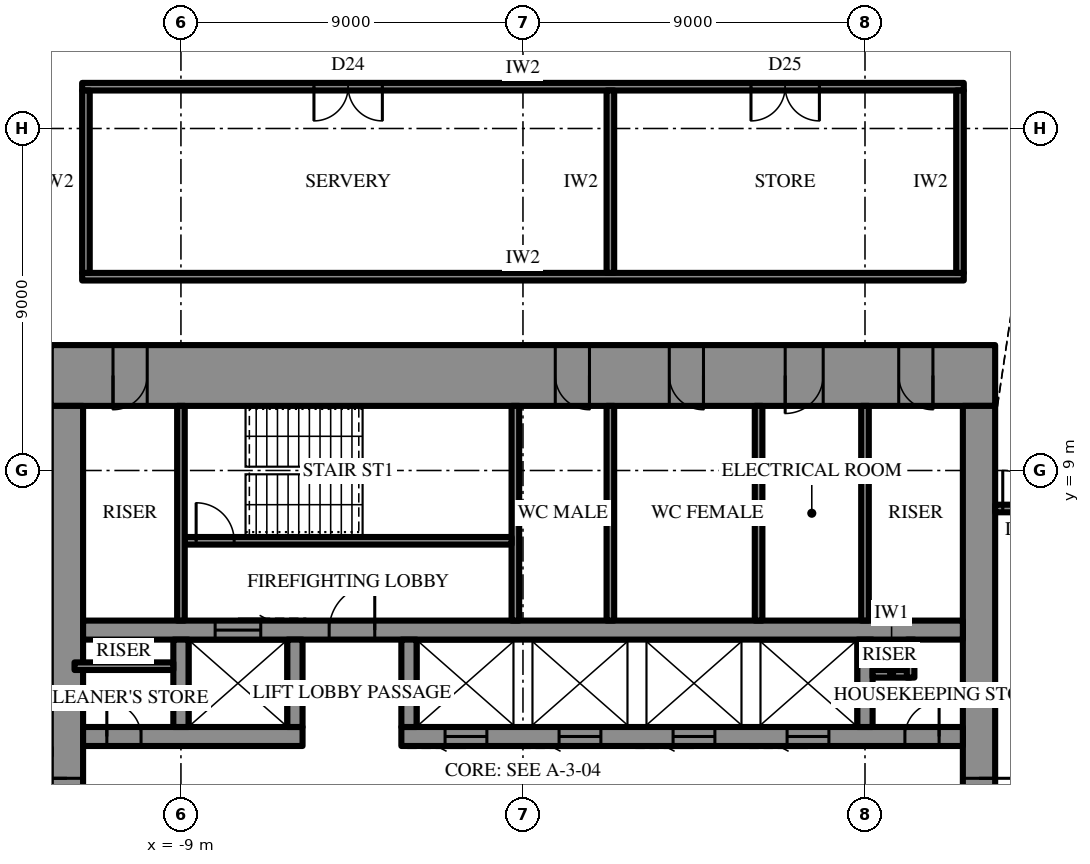
"""IFC4 building model, lengths in metres.
Left out: names, types, materials, properties, quantities, classifications, styles, units other than length and angle.
Written with IfcOpenShell. Run it as: python <this file> out.ifc"""

import sys

from ifc_helpers import new_model, si_unit, direction, frame, frame_2d, origin, place, context, subcontext, project, spatial, rectangle, extrude, element, fill, save


model = new_model("IFC4")
c1 = context("Model", 3, precision=1e-05, world=origin(), true_north=direction((0.0, 1.0)))
c2 = subcontext(c1, "Body", "Model", "MODEL_VIEW")
j1 = project(units=[si_unit("LENGTHUNIT", "METRE"), si_unit("PLANEANGLEUNIT", "RADIAN")], contexts=[c1])
p1 = place(None, origin())
s1 = spatial("IfcSite", under=j1, at=p1, CompositionType="ELEMENT")
p2 = place(p1, origin())
s2 = spatial("IfcBuilding", under=s1, at=p2, CompositionType="ELEMENT")
p3 = place(p2, frame((0.0, 0.0, 387.1)))
s3 = spatial("IfcBuildingStorey", under=s2, at=p3, CompositionType="ELEMENT", Elevation=387.1)
p4 = place(p3, frame((-12.425, 11.5, 0.0), z_axis=(0.0, 0.0, 1.0), x_axis=(1.0, 0.0, 0.0)))
e1 = element("IfcWall", 1, at=p4, inside=s3, PredefinedType="SHEAR", context=c2, shape_type="SweptSolid", body=[
    extrude(rectangle(XDim=24.85, YDim=1.6, at=frame_2d((12.425, 0.0))), origin(), (0.0, 0.0, 1.0), 4.2),
])
p5 = place(p4, frame((13.275, 0.0, 0.0)))
e2 = element("IfcOpeningElement", 2, at=p5, cuts=e1, PredefinedType="OPENING", context=c2, shape_type="SweptSolid", body=[
    extrude(rectangle(XDim=0.9, YDim=2.2, at=frame_2d((0.45, 1.1))), frame((0.0, 0.81, 0.0), z_axis=(0.0, -1.0, 0.0), x_axis=(1.0, 0.0, 0.0)), (0.0, 0.0, 1.0), 1.62),
])
p6 = place(p4, frame((16.275, 0.0, 0.0)))
e3 = element("IfcOpeningElement", 3, at=p6, cuts=e1, PredefinedType="OPENING", context=c2, shape_type="SweptSolid", body=[
    extrude(rectangle(XDim=0.9, YDim=2.2, at=frame_2d((0.45, 1.1))), frame((0.0, 0.81, 0.0), z_axis=(0.0, -1.0, 0.0), x_axis=(1.0, 0.0, 0.0)), (0.0, 0.0, 1.0), 1.62),
])
p7 = place(p4, frame((19.325, 0.0, 0.0)))
e4 = element("IfcOpeningElement", 4, at=p7, cuts=e1, PredefinedType="OPENING", context=c2, shape_type="SweptSolid", body=[
    extrude(rectangle(XDim=1.0, YDim=2.2, at=frame_2d((0.5, 1.1))), frame((0.0, 0.81, 0.0), z_axis=(0.0, -1.0, 0.0), x_axis=(1.0, 0.0, 0.0)), (0.0, 0.0, 1.0), 1.62),
])
p8 = place(p4, frame((1.637, 0.0, 0.0)))
e5 = element("IfcOpeningElement", 5, at=p8, cuts=e1, PredefinedType="OPENING", context=c2, shape_type="SweptSolid", body=[
    extrude(rectangle(XDim=0.9, YDim=2.2, at=frame_2d((0.45, 1.1))), frame((0.0, 0.81, 0.0), z_axis=(0.0, -1.0, 0.0), x_axis=(1.0, 0.0, 0.0)), (0.0, 0.0, 1.0), 1.62),
])
p9 = place(p4, frame((22.312, 0.0, 0.0)))
e6 = element("IfcOpeningElement", 6, at=p9, cuts=e1, PredefinedType="OPENING", context=c2, shape_type="SweptSolid", body=[
    extrude(rectangle(XDim=0.9, YDim=2.2, at=frame_2d((0.45, 1.1))), frame((0.0, 0.81, 0.0), z_axis=(0.0, -1.0, 0.0), x_axis=(1.0, 0.0, 0.0)), (0.0, 0.0, 1.0), 1.62),
])
p10 = place(p3, frame((12.0, -10.7, 0.0), z_axis=(0.0, 0.0, 1.0), x_axis=(0.0, 1.0, 0.0)))
e7 = element("IfcWall", 7, at=p10, inside=s3, PredefinedType="SHEAR", context=c2, shape_type="SweptSolid", body=[
    extrude(rectangle(XDim=21.4, YDim=0.85, at=frame_2d((10.7, 0.0))), origin(), (0.0, 0.0, 1.0), 4.2),
])
p11 = place(p10, frame((9.8, 0.0, 0.0)))
e8 = element("IfcOpeningElement", 8, at=p11, cuts=e7, PredefinedType="OPENING", context=c2, shape_type="SweptSolid", body=[
    extrude(rectangle(XDim=1.8, YDim=2.4, at=frame_2d((0.9, 1.2))), frame((0.0, 0.435, 0.0), z_axis=(0.0, -1.0, 0.0), x_axis=(1.0, 0.0, 0.0)), (0.0, 0.0, 1.0), 0.87),
])
p12 = place(p3, frame((-12.0, 10.7, 0.0), z_axis=(0.0, 0.0, 1.0), x_axis=(0.0, -1.0, 0.0)))
e9 = element("IfcWall", 9, at=p12, inside=s3, PredefinedType="SHEAR", context=c2, shape_type="SweptSolid", body=[
    extrude(rectangle(XDim=21.4, YDim=0.85, at=frame_2d((10.7, 0.0))), origin(), (0.0, 0.0, 1.0), 4.2),
])
p13 = place(p12, frame((9.8, 0.0, 0.0)))
e10 = element("IfcOpeningElement", 10, at=p13, cuts=e9, PredefinedType="OPENING", context=c2, shape_type="SweptSolid", body=[
    extrude(rectangle(XDim=1.8, YDim=2.4, at=frame_2d((0.9, 1.2))), frame((0.0, 0.435, 0.0), z_axis=(0.0, -1.0, 0.0), x_axis=(1.0, 0.0, 0.0)), (0.0, 0.0, 1.0), 0.87),
])
p14 = place(p3, frame((-11.575, 2.0, 0.0), z_axis=(0.0, 0.0, 1.0), x_axis=(1.0, 0.0, 0.0)))
e11 = element("IfcWall", 11, at=p14, inside=s3, PredefinedType="SHEAR", context=c2, shape_type="SweptSolid", body=[
    extrude(rectangle(XDim=5.775, YDim=0.5, at=frame_2d((2.887, 0.0))), origin(), (0.0, 0.0, 1.0), 4.2),
])
p15 = place(p14, frame((0.625, 0.0, 0.0)))
e12 = element("IfcOpeningElement", 12, at=p15, cuts=e11, PredefinedType="OPENING", context=c2, shape_type="SweptSolid", body=[
    extrude(rectangle(XDim=0.9, YDim=2.2, at=frame_2d((0.45, 1.1))), frame((0.0, 0.26, 0.0), z_axis=(0.0, -1.0, 0.0), x_axis=(1.0, 0.0, 0.0)), (0.0, 0.0, 1.0), 0.52),
])
p16 = place(p3, frame((-3.2, 2.0, 0.0), z_axis=(0.0, 0.0, 1.0), x_axis=(1.0, 0.0, 0.0)))
e13 = element("IfcWall", 13, at=p16, inside=s3, PredefinedType="SHEAR", context=c2, shape_type="SweptSolid", body=[
    extrude(rectangle(XDim=14.775, YDim=0.5, at=frame_2d((7.387, 0.0))), origin(), (0.0, 0.0, 1.0), 4.2),
])
p17 = place(p16, frame((13.25, 0.0, 0.0)))
e14 = element("IfcOpeningElement", 14, at=p17, cuts=e13, PredefinedType="OPENING", context=c2, shape_type="SweptSolid", body=[
    extrude(rectangle(XDim=0.9, YDim=2.2, at=frame_2d((0.45, 1.1))), frame((0.0, 0.26, 0.0), z_axis=(0.0, -1.0, 0.0), x_axis=(1.0, 0.0, 0.0)), (0.0, 0.0, 1.0), 0.52),
])
p18 = place(p16, frame((1.15, 0.0, 0.0)))
e15 = element("IfcOpeningElement", 15, at=p18, cuts=e13, PredefinedType="OPENING", context=c2, shape_type="SweptSolid", body=[
    extrude(rectangle(XDim=1.1, YDim=2.2, at=frame_2d((0.55, 1.1))), frame((0.0, 0.26, 0.0), z_axis=(0.0, -1.0, 0.0), x_axis=(1.0, 0.0, 0.0)), (0.0, 0.0, 1.0), 0.52),
])
p19 = place(p16, frame((4.15, 0.0, 0.0)))
e16 = element("IfcOpeningElement", 16, at=p19, cuts=e13, PredefinedType="OPENING", context=c2, shape_type="SweptSolid", body=[
    extrude(rectangle(XDim=1.1, YDim=2.2, at=frame_2d((0.55, 1.1))), frame((0.0, 0.26, 0.0), z_axis=(0.0, -1.0, 0.0), x_axis=(1.0, 0.0, 0.0)), (0.0, 0.0, 1.0), 0.52),
])
p20 = place(p16, frame((7.15, 0.0, 0.0)))
e17 = element("IfcOpeningElement", 17, at=p20, cuts=e13, PredefinedType="OPENING", context=c2, shape_type="SweptSolid", body=[
    extrude(rectangle(XDim=1.1, YDim=2.2, at=frame_2d((0.55, 1.1))), frame((0.0, 0.26, 0.0), z_axis=(0.0, -1.0, 0.0), x_axis=(1.0, 0.0, 0.0)), (0.0, 0.0, 1.0), 0.52),
])
p21 = place(p16, frame((10.15, 0.0, 0.0)))
e18 = element("IfcOpeningElement", 18, at=p21, cuts=e13, PredefinedType="OPENING", context=c2, shape_type="SweptSolid", body=[
    extrude(rectangle(XDim=1.1, YDim=2.2, at=frame_2d((0.55, 1.1))), frame((0.0, 0.26, 0.0), z_axis=(0.0, -1.0, 0.0), x_axis=(1.0, 0.0, 0.0)), (0.0, 0.0, 1.0), 0.52),
])
p22 = place(p3, frame((-11.575, 4.8, 0.0), z_axis=(0.0, 0.0, 1.0), x_axis=(1.0, 0.0, 0.0)))
e19 = element("IfcWall", 19, at=p22, inside=s3, PredefinedType="SHEAR", context=c2, shape_type="SweptSolid", body=[
    extrude(rectangle(XDim=23.15, YDim=0.5, at=frame_2d((11.575, 0.0))), origin(), (0.0, 0.0, 1.0), 4.2),
])
p23 = place(p22, frame((6.475, 0.0, 0.0)))
e20 = element("IfcOpeningElement", 20, at=p23, cuts=e19, PredefinedType="OPENING", context=c2, shape_type="SweptSolid", body=[
    extrude(rectangle(XDim=1.2, YDim=2.2, at=frame_2d((0.6, 1.1))), frame((0.0, 0.26, 0.0), z_axis=(0.0, -1.0, 0.0), x_axis=(1.0, 0.0, 0.0)), (0.0, 0.0, 1.0), 0.52),
])
p24 = place(p22, frame((3.475, 0.0, 0.0)))
e21 = element("IfcOpeningElement", 21, at=p24, cuts=e19, PredefinedType="OPENING", context=c2, shape_type="SweptSolid", body=[
    extrude(rectangle(XDim=1.2, YDim=2.2, at=frame_2d((0.6, 1.1))), frame((0.0, 0.26, 0.0), z_axis=(0.0, -1.0, 0.0), x_axis=(1.0, 0.0, 0.0)), (0.0, 0.0, 1.0), 0.52),
])
for number, where, z_axis, x_axis in (
    (22, (-9.0, 2.25, 0.0), (0.0, 0.0, 1.0), (0.0, 1.0, 0.0)),
    (23, (-6.0, 2.25, 0.0), (0.0, 0.0, 1.0), (0.0, 1.0, 0.0)),
    (24, (-3.0, 2.25, 0.0), (0.0, 0.0, 1.0), (0.0, 1.0, 0.0)),
    (25, (9.0, 2.25, 0.0), (0.0, 0.0, 1.0), (0.0, 1.0, 0.0)),
):
    element("IfcWall", number, at=place(p3, frame(where, z_axis=z_axis, x_axis=x_axis)), inside=s3, PredefinedType="SHEAR", context=c2, shape_type="SweptSolid", body=[
        extrude(rectangle(XDim=2.3, YDim=0.4, at=frame_2d((1.15, 0.0))), origin(), (0.0, 0.0, 1.0), 4.2),
    ])
p25 = place(p3, frame((-0.2, 5.05, 0.0), z_axis=(0.0, 0.0, 1.0), x_axis=(0.0, 1.0, 0.0)))
e26 = element("IfcWall", 26, at=p25, inside=s3, PredefinedType="SHEAR", context=c2, shape_type="SweptSolid", body=[
    extrude(rectangle(XDim=5.65, YDim=0.2, at=frame_2d((2.825, 0.0))), origin(), (0.0, 0.0, 1.0), 4.2),
])
p26 = place(p3, frame((-8.9, 7.15, 0.0), z_axis=(0.0, 0.0, 1.0), x_axis=(1.0, 0.0, 0.0)))
e27 = element("IfcWall", 27, at=p26, inside=s3, PredefinedType="SHEAR", context=c2, shape_type="SweptSolid", body=[
    extrude(rectangle(XDim=8.6, YDim=0.2, at=frame_2d((4.3, 0.0))), origin(), (0.0, 0.0, 1.0), 4.2),
])
p27 = place(p26, frame((0.3, 0.0, 0.0)))
e28 = element("IfcOpeningElement", 28, at=p27, cuts=e27, PredefinedType="OPENING", context=c2, shape_type="SweptSolid", body=[
    extrude(rectangle(XDim=1.0, YDim=2.2, at=frame_2d((0.5, 1.1))), frame((0.0, 0.11, 0.0), z_axis=(0.0, -1.0, 0.0), x_axis=(1.0, 0.0, 0.0)), (0.0, 0.0, 1.0), 0.22),
])
for number, where, z_axis, x_axis in (
    (29, (-9.0, 5.05, 0.0), (0.0, 0.0, 1.0), (0.0, 1.0, 0.0)),
    (30, (9.0, 5.05, 0.0), (0.0, 0.0, 1.0), (0.0, 1.0, 0.0)),
    (31, (2.3, 5.05, 0.0), (0.0, 0.0, 1.0), (0.0, 1.0, 0.0)),
    (32, (6.2, 5.05, 0.0), (0.0, 0.0, 1.0), (0.0, 1.0, 0.0)),
):
    element("IfcWall", number, at=place(p3, frame(where, z_axis=z_axis, x_axis=x_axis)), inside=s3, PredefinedType="PARTITIONING", context=c2, shape_type="SweptSolid", body=[
        extrude(rectangle(XDim=5.65, YDim=0.2, at=frame_2d((2.825, 0.0))), origin(), (0.0, 0.0, 1.0), 4.0),
    ])
p28 = place(p3, frame((-11.8, 3.85, 0.0), z_axis=(0.0, 0.0, 1.0), x_axis=(1.0, 0.0, 0.0)))
e33 = element("IfcWall", 33, at=p28, inside=s3, PredefinedType="PARTITIONING", context=c2, shape_type="SweptSolid", body=[
    extrude(rectangle(XDim=2.6, YDim=0.2, at=frame_2d((1.3, 0.0))), origin(), (0.0, 0.0, 1.0), 4.0),
])
for number, where, z_axis, x_axis in (
    (34, (9.2, 3.65, 0.0), (0.0, 0.0, 1.0), (1.0, 0.0, 0.0)),
    (35, (10.2, 3.55, 0.0), (0.0, 0.0, 1.0), (0.0, 1.0, 0.0)),
):
    element("IfcWall", number, at=place(p3, frame(where, z_axis=z_axis, x_axis=x_axis)), inside=s3, PredefinedType="PARTITIONING", context=c2, shape_type="SweptSolid", body=[
        extrude(rectangle(XDim=1.0, YDim=0.2, at=frame_2d((0.5, 0.0))), origin(), (0.0, 0.0, 1.0), 4.0),
    ])
p29 = place(p3, frame((-11.6, 14.1, 0.0), z_axis=(0.0, 0.0, 1.0), x_axis=(1.0, 0.0, 0.0)))
e36 = element("IfcWall", 36, at=p29, inside=s3, PredefinedType="PARTITIONING", context=c2, shape_type="SweptSolid", body=[
    extrude(rectangle(XDim=23.2, YDim=0.2, at=frame_2d((11.6, 0.0))), origin(), (0.0, 0.0, 1.0), 4.0),
])
p30 = place(p3, frame((-11.6, 19.1, 0.0), z_axis=(0.0, 0.0, 1.0), x_axis=(1.0, 0.0, 0.0)))
e37 = element("IfcWall", 37, at=p30, inside=s3, PredefinedType="PARTITIONING", context=c2, shape_type="SweptSolid", body=[
    extrude(rectangle(XDim=23.2, YDim=0.2, at=frame_2d((11.6, 0.0))), origin(), (0.0, 0.0, 1.0), 4.0),
])
p31 = place(p30, frame((6.1, 0.0, 0.0)))
e38 = element("IfcOpeningElement", 38, at=p31, cuts=e37, PredefinedType="OPENING", context=c2, shape_type="SweptSolid", body=[
    extrude(rectangle(XDim=1.8, YDim=2.4, at=frame_2d((0.9, 1.2))), frame((0.0, 0.11, 0.0), z_axis=(0.0, -1.0, 0.0), x_axis=(1.0, 0.0, 0.0)), (0.0, 0.0, 1.0), 0.22),
])
p32 = place(p30, frame((17.6, 0.0, 0.0)))
e39 = element("IfcOpeningElement", 39, at=p32, cuts=e37, PredefinedType="OPENING", context=c2, shape_type="SweptSolid", body=[
    extrude(rectangle(XDim=1.8, YDim=2.4, at=frame_2d((0.9, 1.2))), frame((0.0, 0.11, 0.0), z_axis=(0.0, -1.0, 0.0), x_axis=(1.0, 0.0, 0.0)), (0.0, 0.0, 1.0), 0.22),
])
for number, where, z_axis, x_axis in (
    (40, (-11.5, 14.2, 0.0), (0.0, 0.0, 1.0), (0.0, 1.0, 0.0)),
    (41, (2.3, 14.2, 0.0), (0.0, 0.0, 1.0), (0.0, 1.0, 0.0)),
    (42, (11.5, 14.2, 0.0), (0.0, 0.0, 1.0), (0.0, 1.0, 0.0)),
):
    element("IfcWall", number, at=place(p3, frame(where, z_axis=z_axis, x_axis=x_axis)), inside=s3, PredefinedType="PARTITIONING", context=c2, shape_type="SweptSolid", body=[
        extrude(rectangle(XDim=4.8, YDim=0.2, at=frame_2d((2.4, 0.0))), origin(), (0.0, 0.0, 1.0), 4.0),
    ])
p33 = place(p3, frame((12.425, 8.0, 0.0), z_axis=(0.0, 0.0, 1.0), x_axis=(1.0, 0.0, 0.0)))
e43 = element("IfcWall", 43, at=p33, inside=s3, PredefinedType="PARTITIONING", context=c2, shape_type="SweptSolid", body=[
    extrude(rectangle(XDim=5.646, YDim=0.2, at=frame_2d((2.823, 0.0))), origin(), (0.0, 0.0, 1.0), 4.0),
])
p34 = place(p33, frame((0.2, 0.0, 0.0)))
e44 = element("IfcOpeningElement", 44, at=p34, cuts=e43, PredefinedType="OPENING", context=c2, shape_type="SweptSolid", body=[
    extrude(rectangle(XDim=1.0, YDim=2.2, at=frame_2d((0.5, 1.1))), frame((0.0, 0.11, 0.0), z_axis=(0.0, -1.0, 0.0), x_axis=(1.0, 0.0, 0.0)), (0.0, 0.0, 1.0), 0.22),
])
p35 = place(p11, frame((1.8, 0.0, 0.0), z_axis=(0.0, 0.0, 1.0), x_axis=(-1.0, 0.0, 0.0)))
e45 = element("IfcDoor", 45, at=p35, inside=s3, OperationType="DOUBLE_DOOR_SINGLE_SWING", PredefinedType="DOOR", context=c2, shape_type="SweptSolid", body=[
    extrude(rectangle(XDim=1.8, YDim=2.4, at=frame_2d((0.9, 1.2))), frame((0.0, 0.025, 0.0), z_axis=(0.0, -1.0, 0.0), x_axis=(1.0, 0.0, 0.0)), (0.0, 0.0, 1.0), 0.05),
])
fill(e8, e45)
p36 = place(p13, frame((1.8, 0.0, 0.0), z_axis=(0.0, 0.0, 1.0), x_axis=(-1.0, 0.0, 0.0)))
e46 = element("IfcDoor", 46, at=p36, inside=s3, OperationType="DOUBLE_DOOR_SINGLE_SWING", PredefinedType="DOOR", context=c2, shape_type="SweptSolid", body=[
    extrude(rectangle(XDim=1.8, YDim=2.4, at=frame_2d((0.9, 1.2))), frame((0.0, 0.025, 0.0), z_axis=(0.0, -1.0, 0.0), x_axis=(1.0, 0.0, 0.0)), (0.0, 0.0, 1.0), 0.05),
])
fill(e10, e46)
p37 = place(p23, origin())
e47 = element("IfcDoor", 47, at=p37, inside=s3, OperationType="SINGLE_SWING_LEFT", PredefinedType="DOOR", context=c2, shape_type="SweptSolid", body=[
    extrude(rectangle(XDim=1.2, YDim=2.2, at=frame_2d((0.6, 1.1))), frame((0.0, 0.025, 0.0), z_axis=(0.0, -1.0, 0.0), x_axis=(1.0, 0.0, 0.0)), (0.0, 0.0, 1.0), 0.05),
])
fill(e20, e47)
p38 = place(p27, origin())
e48 = element("IfcDoor", 48, at=p38, inside=s3, OperationType="SINGLE_SWING_RIGHT", PredefinedType="DOOR", context=c2, shape_type="SweptSolid", body=[
    extrude(rectangle(XDim=1.0, YDim=2.2, at=frame_2d((0.5, 1.1))), frame((0.0, 0.025, 0.0), z_axis=(0.0, -1.0, 0.0), x_axis=(1.0, 0.0, 0.0)), (0.0, 0.0, 1.0), 0.05),
])
fill(e28, e48)
p39 = place(p5, frame((0.9, 0.0, 0.0), z_axis=(0.0, 0.0, 1.0), x_axis=(-1.0, 0.0, 0.0)))
e49 = element("IfcDoor", 49, at=p39, inside=s3, OperationType="SINGLE_SWING_RIGHT", PredefinedType="DOOR", context=c2, shape_type="SweptSolid", body=[
    extrude(rectangle(XDim=0.9, YDim=2.2, at=frame_2d((0.45, 1.1))), frame((0.0, 0.025, 0.0), z_axis=(0.0, -1.0, 0.0), x_axis=(1.0, 0.0, 0.0)), (0.0, 0.0, 1.0), 0.05),
])
fill(e2, e49)
p40 = place(p6, frame((0.9, 0.0, 0.0), z_axis=(0.0, 0.0, 1.0), x_axis=(-1.0, 0.0, 0.0)))
e50 = element("IfcDoor", 50, at=p40, inside=s3, OperationType="SINGLE_SWING_RIGHT", PredefinedType="DOOR", context=c2, shape_type="SweptSolid", body=[
    extrude(rectangle(XDim=0.9, YDim=2.2, at=frame_2d((0.45, 1.1))), frame((0.0, 0.025, 0.0), z_axis=(0.0, -1.0, 0.0), x_axis=(1.0, 0.0, 0.0)), (0.0, 0.0, 1.0), 0.05),
])
fill(e3, e50)
p41 = place(p7, frame((1.0, 0.0, 0.0), z_axis=(0.0, 0.0, 1.0), x_axis=(-1.0, 0.0, 0.0)))
e51 = element("IfcDoor", 51, at=p41, inside=s3, OperationType="SINGLE_SWING_LEFT", PredefinedType="DOOR", context=c2, shape_type="SweptSolid", body=[
    extrude(rectangle(XDim=1.0, YDim=2.2, at=frame_2d((0.5, 1.1))), frame((0.0, 0.025, 0.0), z_axis=(0.0, -1.0, 0.0), x_axis=(1.0, 0.0, 0.0)), (0.0, 0.0, 1.0), 0.05),
])
fill(e4, e51)
p42 = place(p8, frame((0.9, 0.0, 0.0), z_axis=(0.0, 0.0, 1.0), x_axis=(-1.0, 0.0, 0.0)))
e52 = element("IfcDoor", 52, at=p42, inside=s3, OperationType="SINGLE_SWING_LEFT", PredefinedType="DOOR", context=c2, shape_type="SweptSolid", body=[
    extrude(rectangle(XDim=0.9, YDim=2.2, at=frame_2d((0.45, 1.1))), frame((0.0, 0.025, 0.0), z_axis=(0.0, -1.0, 0.0), x_axis=(1.0, 0.0, 0.0)), (0.0, 0.0, 1.0), 0.05),
])
fill(e5, e52)
p43 = place(p9, frame((0.9, 0.0, 0.0), z_axis=(0.0, 0.0, 1.0), x_axis=(-1.0, 0.0, 0.0)))
e53 = element("IfcDoor", 53, at=p43, inside=s3, OperationType="SINGLE_SWING_RIGHT", PredefinedType="DOOR", context=c2, shape_type="SweptSolid", body=[
    extrude(rectangle(XDim=0.9, YDim=2.2, at=frame_2d((0.45, 1.1))), frame((0.0, 0.025, 0.0), z_axis=(0.0, -1.0, 0.0), x_axis=(1.0, 0.0, 0.0)), (0.0, 0.0, 1.0), 0.05),
])
fill(e6, e53)
p44 = place(p15, origin())
e54 = element("IfcDoor", 54, at=p44, inside=s3, OperationType="SINGLE_SWING_RIGHT", PredefinedType="DOOR", context=c2, shape_type="SweptSolid", body=[
    extrude(rectangle(XDim=0.9, YDim=2.2, at=frame_2d((0.45, 1.1))), frame((0.0, 0.025, 0.0), z_axis=(0.0, -1.0, 0.0), x_axis=(1.0, 0.0, 0.0)), (0.0, 0.0, 1.0), 0.05),
])
fill(e12, e54)
p45 = place(p17, origin())
e55 = element("IfcDoor", 55, at=p45, inside=s3, OperationType="SINGLE_SWING_LEFT", PredefinedType="DOOR", context=c2, shape_type="SweptSolid", body=[
    extrude(rectangle(XDim=0.9, YDim=2.2, at=frame_2d((0.45, 1.1))), frame((0.0, 0.025, 0.0), z_axis=(0.0, -1.0, 0.0), x_axis=(1.0, 0.0, 0.0)), (0.0, 0.0, 1.0), 0.05),
])
fill(e14, e55)
p46 = place(p24, origin())
e56 = element("IfcDoor", 56, at=p46, inside=s3, OperationType="SLIDING_TO_LEFT", PredefinedType="DOOR", context=c2, shape_type="SweptSolid", body=[
    extrude(rectangle(XDim=1.2, YDim=2.2, at=frame_2d((0.6, 1.1))), frame((0.0, 0.025, 0.0), z_axis=(0.0, -1.0, 0.0), x_axis=(1.0, 0.0, 0.0)), (0.0, 0.0, 1.0), 0.05),
])
fill(e21, e56)
p47 = place(p18, frame((1.1, 0.0, 0.0), z_axis=(0.0, 0.0, 1.0), x_axis=(-1.0, 0.0, 0.0)))
e57 = element("IfcDoor", 57, at=p47, inside=s3, OperationType="SLIDING_TO_LEFT", PredefinedType="DOOR", context=c2, shape_type="SweptSolid", body=[
    extrude(rectangle(XDim=1.1, YDim=2.2, at=frame_2d((0.55, 1.1))), frame((0.0, 0.025, 0.0), z_axis=(0.0, -1.0, 0.0), x_axis=(1.0, 0.0, 0.0)), (0.0, 0.0, 1.0), 0.05),
])
fill(e15, e57)
p48 = place(p19, frame((1.1, 0.0, 0.0), z_axis=(0.0, 0.0, 1.0), x_axis=(-1.0, 0.0, 0.0)))
e58 = element("IfcDoor", 58, at=p48, inside=s3, OperationType="SLIDING_TO_LEFT", PredefinedType="DOOR", context=c2, shape_type="SweptSolid", body=[
    extrude(rectangle(XDim=1.1, YDim=2.2, at=frame_2d((0.55, 1.1))), frame((0.0, 0.025, 0.0), z_axis=(0.0, -1.0, 0.0), x_axis=(1.0, 0.0, 0.0)), (0.0, 0.0, 1.0), 0.05),
])
fill(e16, e58)
p49 = place(p20, frame((1.1, 0.0, 0.0), z_axis=(0.0, 0.0, 1.0), x_axis=(-1.0, 0.0, 0.0)))
e59 = element("IfcDoor", 59, at=p49, inside=s3, OperationType="SLIDING_TO_LEFT", PredefinedType="DOOR", context=c2, shape_type="SweptSolid", body=[
    extrude(rectangle(XDim=1.1, YDim=2.2, at=frame_2d((0.55, 1.1))), frame((0.0, 0.025, 0.0), z_axis=(0.0, -1.0, 0.0), x_axis=(1.0, 0.0, 0.0)), (0.0, 0.0, 1.0), 0.05),
])
fill(e17, e59)
p50 = place(p21, frame((1.1, 0.0, 0.0), z_axis=(0.0, 0.0, 1.0), x_axis=(-1.0, 0.0, 0.0)))
e60 = element("IfcDoor", 60, at=p50, inside=s3, OperationType="SLIDING_TO_LEFT", PredefinedType="DOOR", context=c2, shape_type="SweptSolid", body=[
    extrude(rectangle(XDim=1.1, YDim=2.2, at=frame_2d((0.55, 1.1))), frame((0.0, 0.025, 0.0), z_axis=(0.0, -1.0, 0.0), x_axis=(1.0, 0.0, 0.0)), (0.0, 0.0, 1.0), 0.05),
])
fill(e18, e60)
p51 = place(p31, frame((1.8, 0.0, 0.0), z_axis=(0.0, 0.0, 1.0), x_axis=(-1.0, 0.0, 0.0)))
e61 = element("IfcDoor", 61, at=p51, inside=s3, OperationType="DOUBLE_DOOR_SINGLE_SWING", PredefinedType="DOOR", context=c2, shape_type="SweptSolid", body=[
    extrude(rectangle(XDim=1.8, YDim=2.4, at=frame_2d((0.9, 1.2))), frame((0.0, 0.025, 0.0), z_axis=(0.0, -1.0, 0.0), x_axis=(1.0, 0.0, 0.0)), (0.0, 0.0, 1.0), 0.05),
])
fill(e38, e61)
p52 = place(p32, frame((1.8, 0.0, 0.0), z_axis=(0.0, 0.0, 1.0), x_axis=(-1.0, 0.0, 0.0)))
e62 = element("IfcDoor", 62, at=p52, inside=s3, OperationType="DOUBLE_DOOR_SINGLE_SWING", PredefinedType="DOOR", context=c2, shape_type="SweptSolid", body=[
    extrude(rectangle(XDim=1.8, YDim=2.4, at=frame_2d((0.9, 1.2))), frame((0.0, 0.025, 0.0), z_axis=(0.0, -1.0, 0.0), x_axis=(1.0, 0.0, 0.0)), (0.0, 0.0, 1.0), 0.05),
])
fill(e39, e62)
p53 = place(p34, origin())
e63 = element("IfcDoor", 63, at=p53, inside=s3, OperationType="SINGLE_SWING_RIGHT", PredefinedType="DOOR", context=c2, shape_type="SweptSolid", body=[
    extrude(rectangle(XDim=1.0, YDim=2.2, at=frame_2d((0.5, 1.1))), frame((0.0, 0.025, 0.0), z_axis=(0.0, -1.0, 0.0), x_axis=(1.0, 0.0, 0.0)), (0.0, 0.0, 1.0), 0.05),
])
fill(e44, e63)
save(model, sys.argv[1])
